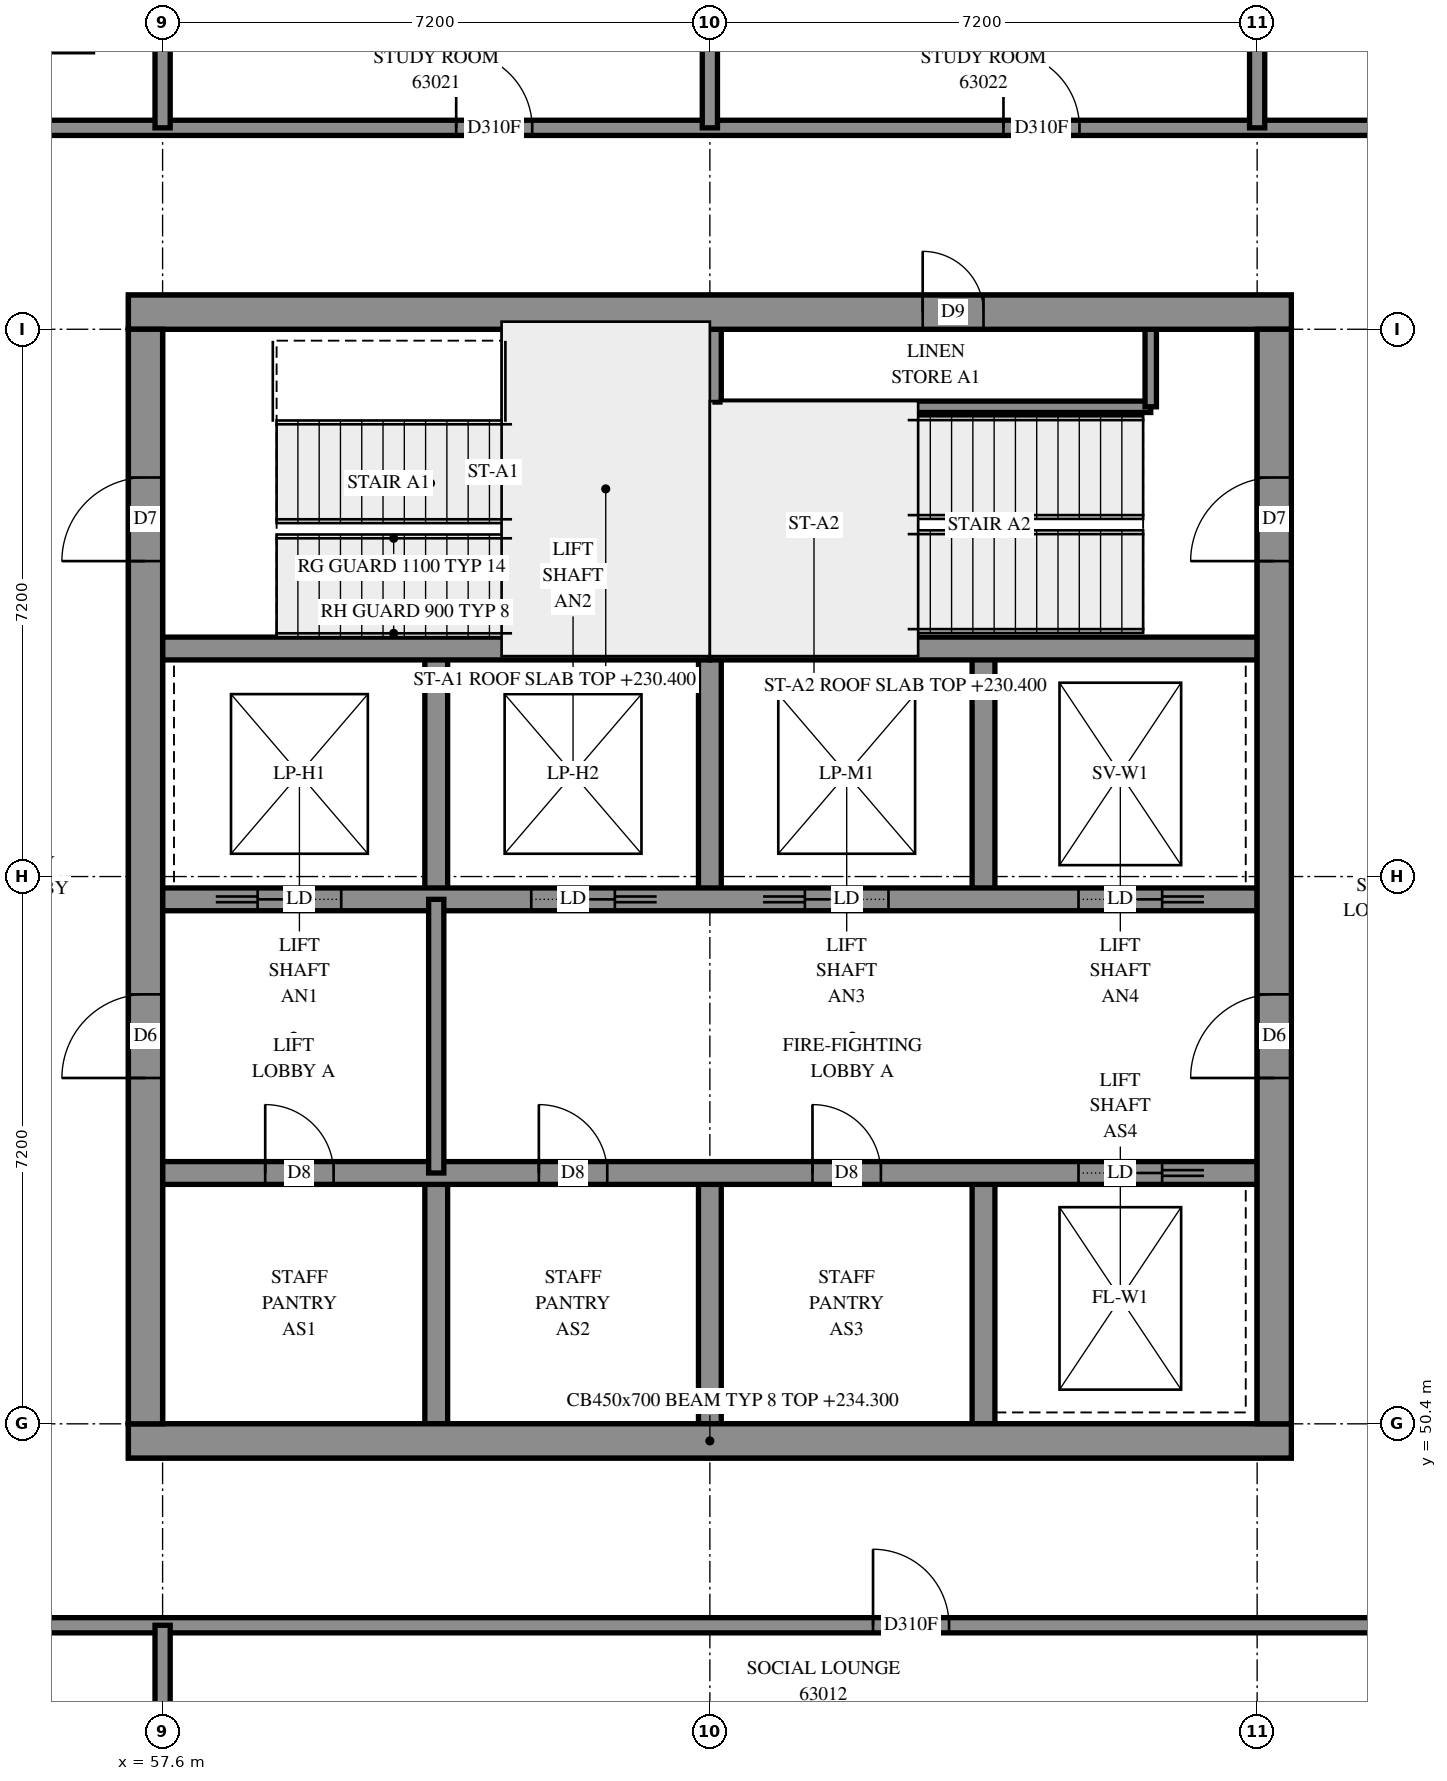
"""IFC4 building model, lengths in metres.
Left out: names, types, materials, properties, quantities, classifications, styles, units other than length and angle.
Written with IfcOpenShell. Run it as: python <this file> out.ifc"""

import sys

from ifc_helpers import new_model, si_unit, direction, frame, frame_2d, origin, place, context, subcontext, project, spatial, rectangle, extrude, element, fill, save


model = new_model("IFC4")
c1 = context("Model", 3, precision=1e-05, world=origin(), true_north=direction((0.0, 1.0)))
c2 = subcontext(c1, "Body", "Model", "MODEL_VIEW")
j1 = project(units=[si_unit("LENGTHUNIT", "METRE"), si_unit("PLANEANGLEUNIT", "RADIAN")], contexts=[c1])
p1 = place(None, origin())
s1 = spatial("IfcSite", under=j1, at=p1, CompositionType="ELEMENT")
p2 = place(p1, origin())
s2 = spatial("IfcBuilding", under=s1, at=p2, CompositionType="ELEMENT")
p3 = place(p2, frame((0.0, 0.0, 230.4)))
s3 = spatial("IfcBuildingStorey", under=s2, at=p3, CompositionType="ELEMENT", Elevation=230.4)
p4 = place(p3, frame((57.15, 50.175, -0.3), z_axis=(0.0, 0.0, 1.0), x_axis=(1.0, 0.0, 0.0)))
e1 = element("IfcWall", 1, at=p4, inside=s3, PredefinedType="SHEAR", context=c2, shape_type="SweptSolid", body=[
    extrude(rectangle(XDim=15.3, YDim=0.45, at=frame_2d((7.65, 0.0))), origin(), (0.0, 0.0, 1.0), 3.5),
])
p5 = place(p3, frame((57.15, 65.025, -0.3), z_axis=(0.0, 0.0, 1.0), x_axis=(1.0, 0.0, 0.0)))
e2 = element("IfcWall", 2, at=p5, inside=s3, PredefinedType="SHEAR", context=c2, shape_type="SweptSolid", body=[
    extrude(rectangle(XDim=15.3, YDim=0.45, at=frame_2d((7.65, 0.0))), origin(), (0.0, 0.0, 1.0), 3.5),
])
p6 = place(p5, frame((10.45, 0.0, 0.3)))
e3 = element("IfcOpeningElement", 3, at=p6, cuts=e2, PredefinedType="OPENING", context=c2, shape_type="SweptSolid", body=[
    extrude(rectangle(XDim=0.8, YDim=2.1, at=frame_2d((0.4, 1.05))), frame((0.0, 0.235, 0.0), z_axis=(0.0, -1.0, 0.0), x_axis=(1.0, 0.0, 0.0)), (0.0, 0.0, 1.0), 0.47),
])
p7 = place(p3, frame((57.375, 50.4, -0.3), z_axis=(0.0, 0.0, 1.0), x_axis=(0.0, 1.0, 0.0)))
e4 = element("IfcWall", 4, at=p7, inside=s3, PredefinedType="SHEAR", context=c2, shape_type="SweptSolid", body=[
    extrude(rectangle(XDim=14.4, YDim=0.45, at=frame_2d((7.2, 0.0))), origin(), (0.0, 0.0, 1.0), 3.5),
])
p8 = place(p7, frame((4.55, 0.0, 0.3)))
e5 = element("IfcOpeningElement", 5, at=p8, cuts=e4, PredefinedType="OPENING", context=c2, shape_type="SweptSolid", body=[
    extrude(rectangle(XDim=1.1, YDim=2.1, at=frame_2d((0.55, 1.05))), frame((0.0, 0.235, 0.0), z_axis=(0.0, -1.0, 0.0), x_axis=(1.0, 0.0, 0.0)), (0.0, 0.0, 1.0), 0.47),
])
p9 = place(p7, frame((11.35, 0.0, 0.3)))
e6 = element("IfcOpeningElement", 6, at=p9, cuts=e4, PredefinedType="OPENING", context=c2, shape_type="SweptSolid", body=[
    extrude(rectangle(XDim=1.1, YDim=2.1, at=frame_2d((0.55, 1.05))), frame((0.0, 0.235, 0.0), z_axis=(0.0, -1.0, 0.0), x_axis=(1.0, 0.0, 0.0)), (0.0, 0.0, 1.0), 0.47),
])
p10 = place(p3, frame((72.225, 50.4, -0.3), z_axis=(0.0, 0.0, 1.0), x_axis=(0.0, 1.0, 0.0)))
e7 = element("IfcWall", 7, at=p10, inside=s3, PredefinedType="SHEAR", context=c2, shape_type="SweptSolid", body=[
    extrude(rectangle(XDim=14.4, YDim=0.45, at=frame_2d((7.2, 0.0))), origin(), (0.0, 0.0, 1.0), 3.5),
])
p11 = place(p10, frame((4.55, 0.0, 0.3)))
e8 = element("IfcOpeningElement", 8, at=p11, cuts=e7, PredefinedType="OPENING", context=c2, shape_type="SweptSolid", body=[
    extrude(rectangle(XDim=1.1, YDim=2.1, at=frame_2d((0.55, 1.05))), frame((0.0, 0.235, 0.0), z_axis=(0.0, -1.0, 0.0), x_axis=(1.0, 0.0, 0.0)), (0.0, 0.0, 1.0), 0.47),
])
p12 = place(p10, frame((11.35, 0.0, 0.3)))
e9 = element("IfcOpeningElement", 9, at=p12, cuts=e7, PredefinedType="OPENING", context=c2, shape_type="SweptSolid", body=[
    extrude(rectangle(XDim=1.1, YDim=2.1, at=frame_2d((0.55, 1.05))), frame((0.0, 0.235, 0.0), z_axis=(0.0, -1.0, 0.0), x_axis=(1.0, 0.0, 0.0)), (0.0, 0.0, 1.0), 0.47),
])
for number, where, z_axis, x_axis in (
    (10, (61.2, 50.4, 0.0), (0.0, 0.0, 1.0), (0.0, 1.0, 0.0)),
    (11, (61.2, 57.3, 0.0), (0.0, 0.0, 1.0), (0.0, 1.0, 0.0)),
    (12, (64.8, 50.4, 0.0), (0.0, 0.0, 1.0), (0.0, 1.0, 0.0)),
    (13, (64.8, 57.3, 0.0), (0.0, 0.0, 1.0), (0.0, 1.0, 0.0)),
    (14, (68.4, 50.4, 0.0), (0.0, 0.0, 1.0), (0.0, 1.0, 0.0)),
    (15, (68.4, 57.3, 0.0), (0.0, 0.0, 1.0), (0.0, 1.0, 0.0)),
):
    element("IfcWall", number, at=place(p3, frame(where, z_axis=z_axis, x_axis=x_axis)), inside=s3, PredefinedType="SOLIDWALL", context=c2, shape_type="SweptSolid", body=[
        extrude(rectangle(XDim=3.3, YDim=0.3, at=frame_2d((1.65, 0.0))), origin(), (0.0, 0.0, 1.0), 3.9),
    ])
p13 = place(p3, frame((57.6, 53.7, 0.0), z_axis=(0.0, 0.0, 1.0), x_axis=(1.0, 0.0, 0.0)))
e16 = element("IfcWall", 16, at=p13, inside=s3, PredefinedType="SOLIDWALL", context=c2, shape_type="SweptSolid", body=[
    extrude(rectangle(XDim=14.4, YDim=0.3, at=frame_2d((7.2, 0.0))), origin(), (0.0, 0.0, 1.0), 3.9),
])
p14 = place(p13, frame((1.35, 0.0, 0.0)))
e17 = element("IfcOpeningElement", 17, at=p14, cuts=e16, PredefinedType="OPENING", context=c2, shape_type="SweptSolid", body=[
    extrude(rectangle(XDim=0.9, YDim=2.1, at=frame_2d((0.45, 1.05))), frame((0.0, 0.16, 0.0), z_axis=(0.0, -1.0, 0.0), x_axis=(1.0, 0.0, 0.0)), (0.0, 0.0, 1.0), 0.32),
])
p15 = place(p13, frame((4.95, 0.0, 0.0)))
e18 = element("IfcOpeningElement", 18, at=p15, cuts=e16, PredefinedType="OPENING", context=c2, shape_type="SweptSolid", body=[
    extrude(rectangle(XDim=0.9, YDim=2.1, at=frame_2d((0.45, 1.05))), frame((0.0, 0.16, 0.0), z_axis=(0.0, -1.0, 0.0), x_axis=(1.0, 0.0, 0.0)), (0.0, 0.0, 1.0), 0.32),
])
p16 = place(p13, frame((8.55, 0.0, 0.0)))
e19 = element("IfcOpeningElement", 19, at=p16, cuts=e16, PredefinedType="OPENING", context=c2, shape_type="SweptSolid", body=[
    extrude(rectangle(XDim=0.9, YDim=2.1, at=frame_2d((0.45, 1.05))), frame((0.0, 0.16, 0.0), z_axis=(0.0, -1.0, 0.0), x_axis=(1.0, 0.0, 0.0)), (0.0, 0.0, 1.0), 0.32),
])
p17 = place(p13, frame((12.05, 0.0, 0.0)))
e20 = element("IfcOpeningElement", 20, at=p17, cuts=e16, PredefinedType="OPENING", context=c2, shape_type="SweptSolid", body=[
    extrude(rectangle(XDim=1.1, YDim=2.1, at=frame_2d((0.55, 1.05))), frame((0.0, 0.16, 0.0), z_axis=(0.0, -1.0, 0.0), x_axis=(1.0, 0.0, 0.0)), (0.0, 0.0, 1.0), 0.32),
])
p18 = place(p3, frame((57.6, 57.3, 0.0), z_axis=(0.0, 0.0, 1.0), x_axis=(1.0, 0.0, 0.0)))
e21 = element("IfcWall", 21, at=p18, inside=s3, PredefinedType="SOLIDWALL", context=c2, shape_type="SweptSolid", body=[
    extrude(rectangle(XDim=14.4, YDim=0.3, at=frame_2d((7.2, 0.0))), origin(), (0.0, 0.0, 1.0), 3.9),
])
p19 = place(p18, frame((1.25, 0.0, 0.0)))
e22 = element("IfcOpeningElement", 22, at=p19, cuts=e21, PredefinedType="OPENING", context=c2, shape_type="SweptSolid", body=[
    extrude(rectangle(XDim=1.1, YDim=2.1, at=frame_2d((0.55, 1.05))), frame((0.0, 0.16, 0.0), z_axis=(0.0, -1.0, 0.0), x_axis=(1.0, 0.0, 0.0)), (0.0, 0.0, 1.0), 0.32),
])
p20 = place(p18, frame((4.85, 0.0, 0.0)))
e23 = element("IfcOpeningElement", 23, at=p20, cuts=e21, PredefinedType="OPENING", context=c2, shape_type="SweptSolid", body=[
    extrude(rectangle(XDim=1.1, YDim=2.1, at=frame_2d((0.55, 1.05))), frame((0.0, 0.16, 0.0), z_axis=(0.0, -1.0, 0.0), x_axis=(1.0, 0.0, 0.0)), (0.0, 0.0, 1.0), 0.32),
])
p21 = place(p18, frame((8.45, 0.0, 0.0)))
e24 = element("IfcOpeningElement", 24, at=p21, cuts=e21, PredefinedType="OPENING", context=c2, shape_type="SweptSolid", body=[
    extrude(rectangle(XDim=1.1, YDim=2.1, at=frame_2d((0.55, 1.05))), frame((0.0, 0.16, 0.0), z_axis=(0.0, -1.0, 0.0), x_axis=(1.0, 0.0, 0.0)), (0.0, 0.0, 1.0), 0.32),
])
p22 = place(p18, frame((12.05, 0.0, 0.0)))
e25 = element("IfcOpeningElement", 25, at=p22, cuts=e21, PredefinedType="OPENING", context=c2, shape_type="SweptSolid", body=[
    extrude(rectangle(XDim=1.1, YDim=2.1, at=frame_2d((0.55, 1.05))), frame((0.0, 0.16, 0.0), z_axis=(0.0, -1.0, 0.0), x_axis=(1.0, 0.0, 0.0)), (0.0, 0.0, 1.0), 0.32),
])
for number, where, z_axis, x_axis in (
    (26, (57.6, 60.6, 0.0), (0.0, 0.0, 1.0), (1.0, 0.0, 0.0)),
    (27, (64.8, 60.6, 0.0), (0.0, 0.0, 1.0), (1.0, 0.0, 0.0)),
):
    element("IfcWall", number, at=place(p3, frame(where, z_axis=z_axis, x_axis=x_axis)), inside=s3, PredefinedType="SOLIDWALL", context=c2, shape_type="SweptSolid", body=[
        extrude(rectangle(XDim=7.2, YDim=0.3, at=frame_2d((3.6, 0.0))), origin(), (0.0, 0.0, 1.0), 3.9),
    ])
p23 = place(p3, frame((64.8, 60.6, 0.0), z_axis=(0.0, 0.0, 1.0), x_axis=(0.0, 1.0, 0.0)))
e28 = element("IfcWall", 28, at=p23, inside=s3, PredefinedType="SOLIDWALL", context=c2, shape_type="SweptSolid", body=[
    extrude(rectangle(XDim=4.2, YDim=0.3, at=frame_2d((2.1, 0.0))), origin(), (0.0, 0.0, 1.0), 3.9),
])
p24 = place(p3, frame((56.678, 68.725, 0.0), z_axis=(0.0, 0.0, 1.0), x_axis=(-1.0, 0.0, 0.0)))
e29 = element("IfcWall", 29, at=p24, inside=s3, PredefinedType="SOLIDWALL", context=c2, shape_type="SweptSolid", body=[
    extrude(rectangle(XDim=3.6, YDim=0.55, at=frame_2d((1.8, 0.0))), origin(), (0.0, 0.0, 1.0), 3.9),
])
p25 = place(p24, frame((0.6, 0.0, 0.0)))
e30 = element("IfcOpeningElement", 30, at=p25, cuts=e29, PredefinedType="OPENING", context=c2, shape_type="SweptSolid", body=[
    extrude(rectangle(XDim=1.2, YDim=2.4, at=frame_2d((0.6, 1.2))), frame((0.0, 0.285, 0.0), z_axis=(0.0, -1.0, 0.0), x_axis=(1.0, 0.0, 0.0)), (0.0, 0.0, 1.0), 0.57),
])
p26 = place(p3, frame((64.95, 63.78, 0.0), z_axis=(0.0, 0.0, 1.0), x_axis=(1.0, 0.0, 0.0)))
e31 = element("IfcWall", 31, at=p26, inside=s3, PredefinedType="PARTITIONING", context=c2, shape_type="SweptSolid", body=[
    extrude(rectangle(XDim=5.65, YDim=0.15, at=frame_2d((2.825, 0.0))), origin(), (0.0, 0.0, 1.0), 3.9),
])
p27 = place(p3, frame((70.6, 63.78, 0.0), z_axis=(0.0, 0.0, 1.0), x_axis=(0.0, 1.0, 0.0)))
e32 = element("IfcWall", 32, at=p27, inside=s3, PredefinedType="PARTITIONING", context=c2, shape_type="SweptSolid", body=[
    extrude(rectangle(XDim=1.02, YDim=0.15, at=frame_2d((0.51, 0.0))), origin(), (0.0, 0.0, 1.0), 3.9),
])
p28 = place(p3, frame((61.2, 53.7, 0.0), z_axis=(0.0, 0.0, 1.0), x_axis=(0.0, 1.0, 0.0)))
e33 = element("IfcWall", 33, at=p28, inside=s3, PredefinedType="PARTITIONING", context=c2, shape_type="SweptSolid", body=[
    extrude(rectangle(XDim=3.6, YDim=0.2, at=frame_2d((1.8, 0.0))), origin(), (0.0, 0.0, 1.0), 3.9),
])
p29 = place(p3, frame((54.95, 67.45, 0.0), z_axis=(0.0, 0.0, 1.0), x_axis=(1.0, 0.0, 0.0)))
e34 = element("IfcWall", 34, at=p29, inside=s3, PredefinedType="PARTITIONING", context=c2, shape_type="SweptSolid", body=[
    extrude(rectangle(XDim=19.7, YDim=0.2, at=frame_2d((9.85, 0.0))), origin(), (0.0, 0.0, 1.0), 3.9),
])
p30 = place(p29, frame((6.513, 0.0, 0.0)))
e35 = element("IfcOpeningElement", 35, at=p30, cuts=e34, PredefinedType="OPENING", context=c2, shape_type="SweptSolid", body=[
    extrude(rectangle(XDim=1.0, YDim=2.1, at=frame_2d((0.5, 1.05))), frame((0.0, 0.11, 0.0), z_axis=(0.0, -1.0, 0.0), x_axis=(1.0, 0.0, 0.0)), (0.0, 0.0, 1.0), 0.22),
])
p31 = place(p29, frame((13.713, 0.0, 0.0)))
e36 = element("IfcOpeningElement", 36, at=p31, cuts=e34, PredefinedType="OPENING", context=c2, shape_type="SweptSolid", body=[
    extrude(rectangle(XDim=1.0, YDim=2.1, at=frame_2d((0.5, 1.05))), frame((0.0, 0.11, 0.0), z_axis=(0.0, -1.0, 0.0), x_axis=(1.0, 0.0, 0.0)), (0.0, 0.0, 1.0), 0.22),
])
p32 = place(p3, frame((54.95, 47.75, 0.0), z_axis=(0.0, 0.0, 1.0), x_axis=(1.0, 0.0, 0.0)))
e37 = element("IfcWall", 37, at=p32, inside=s3, PredefinedType="PARTITIONING", context=c2, shape_type="SweptSolid", body=[
    extrude(rectangle(XDim=19.296, YDim=0.2, at=frame_2d((9.648, 0.0))), origin(), (0.0, 0.0, 1.0), 3.9),
])
p33 = place(p32, frame((11.997, 0.0, 0.0)))
e38 = element("IfcOpeningElement", 38, at=p33, cuts=e37, PredefinedType="OPENING", context=c2, shape_type="SweptSolid", body=[
    extrude(rectangle(XDim=1.0, YDim=2.1, at=frame_2d((0.5, 1.05))), frame((0.0, 0.11, 0.0), z_axis=(0.0, -1.0, 0.0), x_axis=(1.0, 0.0, 0.0)), (0.0, 0.0, 1.0), 0.22),
])
for number, where, z_axis, x_axis in (
    (39, (57.6, 46.33, 0.0), (0.0, 0.0, 1.0), (0.0, 1.0, 0.0)),
    (40, (57.6, 67.45, 0.0), (0.0, 0.0, 1.0), (0.0, 1.0, 0.0)),
    (41, (64.8, 67.45, 0.0), (0.0, 0.0, 1.0), (0.0, 1.0, 0.0)),
    (42, (72.0, 67.45, 0.0), (0.0, 0.0, 1.0), (0.0, 1.0, 0.0)),
):
    element("IfcWall", number, at=place(p3, frame(where, z_axis=z_axis, x_axis=x_axis)), inside=s3, PredefinedType="PARTITIONING", context=c2, shape_type="SweptSolid", body=[
        extrude(rectangle(XDim=1.42, YDim=0.2, at=frame_2d((0.71, 0.0))), origin(), (0.0, 0.0, 1.0), 3.9),
    ])
p34 = place(p6, origin())
e43 = element("IfcDoor", 43, at=p34, inside=s3, OperationType="SINGLE_SWING_RIGHT", PredefinedType="DOOR", context=c2, shape_type="SweptSolid", body=[
    extrude(rectangle(XDim=0.8, YDim=2.1, at=frame_2d((0.4, 1.05))), frame((0.0, 0.025, 0.0), z_axis=(0.0, -1.0, 0.0), x_axis=(1.0, 0.0, 0.0)), (0.0, 0.0, 1.0), 0.05),
])
fill(e3, e43)
p35 = place(p8, origin())
e44 = element("IfcDoor", 44, at=p35, inside=s3, OperationType="DOUBLE_DOOR_SINGLE_SWING", PredefinedType="DOOR", context=c2, shape_type="SweptSolid", body=[
    extrude(rectangle(XDim=1.1, YDim=2.1, at=frame_2d((0.55, 1.05))), frame((0.0, 0.025, 0.0), z_axis=(0.0, -1.0, 0.0), x_axis=(1.0, 0.0, 0.0)), (0.0, 0.0, 1.0), 0.05),
])
fill(e5, e44)
p36 = place(p11, origin())
e45 = element("IfcDoor", 45, at=p36, inside=s3, OperationType="DOUBLE_DOOR_SINGLE_SWING", PredefinedType="DOOR", context=c2, shape_type="SweptSolid", body=[
    extrude(rectangle(XDim=1.1, YDim=2.1, at=frame_2d((0.55, 1.05))), frame((0.0, 0.025, 0.0), z_axis=(0.0, -1.0, 0.0), x_axis=(1.0, 0.0, 0.0)), (0.0, 0.0, 1.0), 0.05),
])
fill(e8, e45)
p37 = place(p9, origin())
e46 = element("IfcDoor", 46, at=p37, inside=s3, OperationType="SINGLE_SWING_LEFT", PredefinedType="DOOR", context=c2, shape_type="SweptSolid", body=[
    extrude(rectangle(XDim=1.1, YDim=2.1, at=frame_2d((0.55, 1.05))), frame((0.0, 0.025, 0.0), z_axis=(0.0, -1.0, 0.0), x_axis=(1.0, 0.0, 0.0)), (0.0, 0.0, 1.0), 0.05),
])
fill(e6, e46)
p38 = place(p12, origin())
e47 = element("IfcDoor", 47, at=p38, inside=s3, OperationType="SINGLE_SWING_RIGHT", PredefinedType="DOOR", context=c2, shape_type="SweptSolid", body=[
    extrude(rectangle(XDim=1.1, YDim=2.1, at=frame_2d((0.55, 1.05))), frame((0.0, 0.025, 0.0), z_axis=(0.0, -1.0, 0.0), x_axis=(1.0, 0.0, 0.0)), (0.0, 0.0, 1.0), 0.05),
])
fill(e9, e47)
p39 = place(p14, origin())
e48 = element("IfcDoor", 48, at=p39, inside=s3, OperationType="SINGLE_SWING_LEFT", PredefinedType="DOOR", context=c2, shape_type="SweptSolid", body=[
    extrude(rectangle(XDim=0.9, YDim=2.1, at=frame_2d((0.45, 1.05))), frame((0.0, 0.025, 0.0), z_axis=(0.0, -1.0, 0.0), x_axis=(1.0, 0.0, 0.0)), (0.0, 0.0, 1.0), 0.05),
])
fill(e17, e48)
p40 = place(p15, origin())
e49 = element("IfcDoor", 49, at=p40, inside=s3, OperationType="SINGLE_SWING_LEFT", PredefinedType="DOOR", context=c2, shape_type="SweptSolid", body=[
    extrude(rectangle(XDim=0.9, YDim=2.1, at=frame_2d((0.45, 1.05))), frame((0.0, 0.025, 0.0), z_axis=(0.0, -1.0, 0.0), x_axis=(1.0, 0.0, 0.0)), (0.0, 0.0, 1.0), 0.05),
])
fill(e18, e49)
p41 = place(p16, origin())
e50 = element("IfcDoor", 50, at=p41, inside=s3, OperationType="SINGLE_SWING_LEFT", PredefinedType="DOOR", context=c2, shape_type="SweptSolid", body=[
    extrude(rectangle(XDim=0.9, YDim=2.1, at=frame_2d((0.45, 1.05))), frame((0.0, 0.025, 0.0), z_axis=(0.0, -1.0, 0.0), x_axis=(1.0, 0.0, 0.0)), (0.0, 0.0, 1.0), 0.05),
])
fill(e19, e50)
p42 = place(p17, origin())
e51 = element("IfcDoor", 51, at=p42, inside=s3, OperationType="SLIDING_TO_RIGHT", PredefinedType="DOOR", context=c2, shape_type="SweptSolid", body=[
    extrude(rectangle(XDim=1.1, YDim=2.1, at=frame_2d((0.55, 1.05))), frame((0.0, 0.025, 0.0), z_axis=(0.0, -1.0, 0.0), x_axis=(1.0, 0.0, 0.0)), (0.0, 0.0, 1.0), 0.05),
])
fill(e20, e51)
p43 = place(p19, origin())
e52 = element("IfcDoor", 52, at=p43, inside=s3, OperationType="SLIDING_TO_LEFT", PredefinedType="DOOR", context=c2, shape_type="SweptSolid", body=[
    extrude(rectangle(XDim=1.1, YDim=2.1, at=frame_2d((0.55, 1.05))), frame((0.0, 0.025, 0.0), z_axis=(0.0, -1.0, 0.0), x_axis=(1.0, 0.0, 0.0)), (0.0, 0.0, 1.0), 0.05),
])
fill(e22, e52)
p44 = place(p20, origin())
e53 = element("IfcDoor", 53, at=p44, inside=s3, OperationType="SLIDING_TO_RIGHT", PredefinedType="DOOR", context=c2, shape_type="SweptSolid", body=[
    extrude(rectangle(XDim=1.1, YDim=2.1, at=frame_2d((0.55, 1.05))), frame((0.0, 0.025, 0.0), z_axis=(0.0, -1.0, 0.0), x_axis=(1.0, 0.0, 0.0)), (0.0, 0.0, 1.0), 0.05),
])
fill(e23, e53)
p45 = place(p21, origin())
e54 = element("IfcDoor", 54, at=p45, inside=s3, OperationType="SLIDING_TO_LEFT", PredefinedType="DOOR", context=c2, shape_type="SweptSolid", body=[
    extrude(rectangle(XDim=1.1, YDim=2.1, at=frame_2d((0.55, 1.05))), frame((0.0, 0.025, 0.0), z_axis=(0.0, -1.0, 0.0), x_axis=(1.0, 0.0, 0.0)), (0.0, 0.0, 1.0), 0.05),
])
fill(e24, e54)
p46 = place(p22, origin())
e55 = element("IfcDoor", 55, at=p46, inside=s3, OperationType="SLIDING_TO_RIGHT", PredefinedType="DOOR", context=c2, shape_type="SweptSolid", body=[
    extrude(rectangle(XDim=1.1, YDim=2.1, at=frame_2d((0.55, 1.05))), frame((0.0, 0.025, 0.0), z_axis=(0.0, -1.0, 0.0), x_axis=(1.0, 0.0, 0.0)), (0.0, 0.0, 1.0), 0.05),
])
fill(e25, e55)
p47 = place(p33, origin())
e56 = element("IfcDoor", 56, at=p47, inside=s3, OperationType="SINGLE_SWING_LEFT", PredefinedType="DOOR", context=c2, shape_type="SweptSolid", body=[
    extrude(rectangle(XDim=1.0, YDim=2.1, at=frame_2d((0.5, 1.05))), frame((0.0, 0.025, 0.0), z_axis=(0.0, -1.0, 0.0), x_axis=(1.0, 0.0, 0.0)), (0.0, 0.0, 1.0), 0.05),
])
fill(e38, e56)
p48 = place(p30, origin())
e57 = element("IfcDoor", 57, at=p48, inside=s3, OperationType="SINGLE_SWING_RIGHT", PredefinedType="DOOR", context=c2, shape_type="SweptSolid", body=[
    extrude(rectangle(XDim=1.0, YDim=2.1, at=frame_2d((0.5, 1.05))), frame((0.0, 0.025, 0.0), z_axis=(0.0, -1.0, 0.0), x_axis=(1.0, 0.0, 0.0)), (0.0, 0.0, 1.0), 0.05),
])
fill(e35, e57)
p49 = place(p31, origin())
e58 = element("IfcDoor", 58, at=p49, inside=s3, OperationType="SINGLE_SWING_RIGHT", PredefinedType="DOOR", context=c2, shape_type="SweptSolid", body=[
    extrude(rectangle(XDim=1.0, YDim=2.1, at=frame_2d((0.5, 1.05))), frame((0.0, 0.025, 0.0), z_axis=(0.0, -1.0, 0.0), x_axis=(1.0, 0.0, 0.0)), (0.0, 0.0, 1.0), 0.05),
])
fill(e36, e58)
save(model, sys.argv[1])
